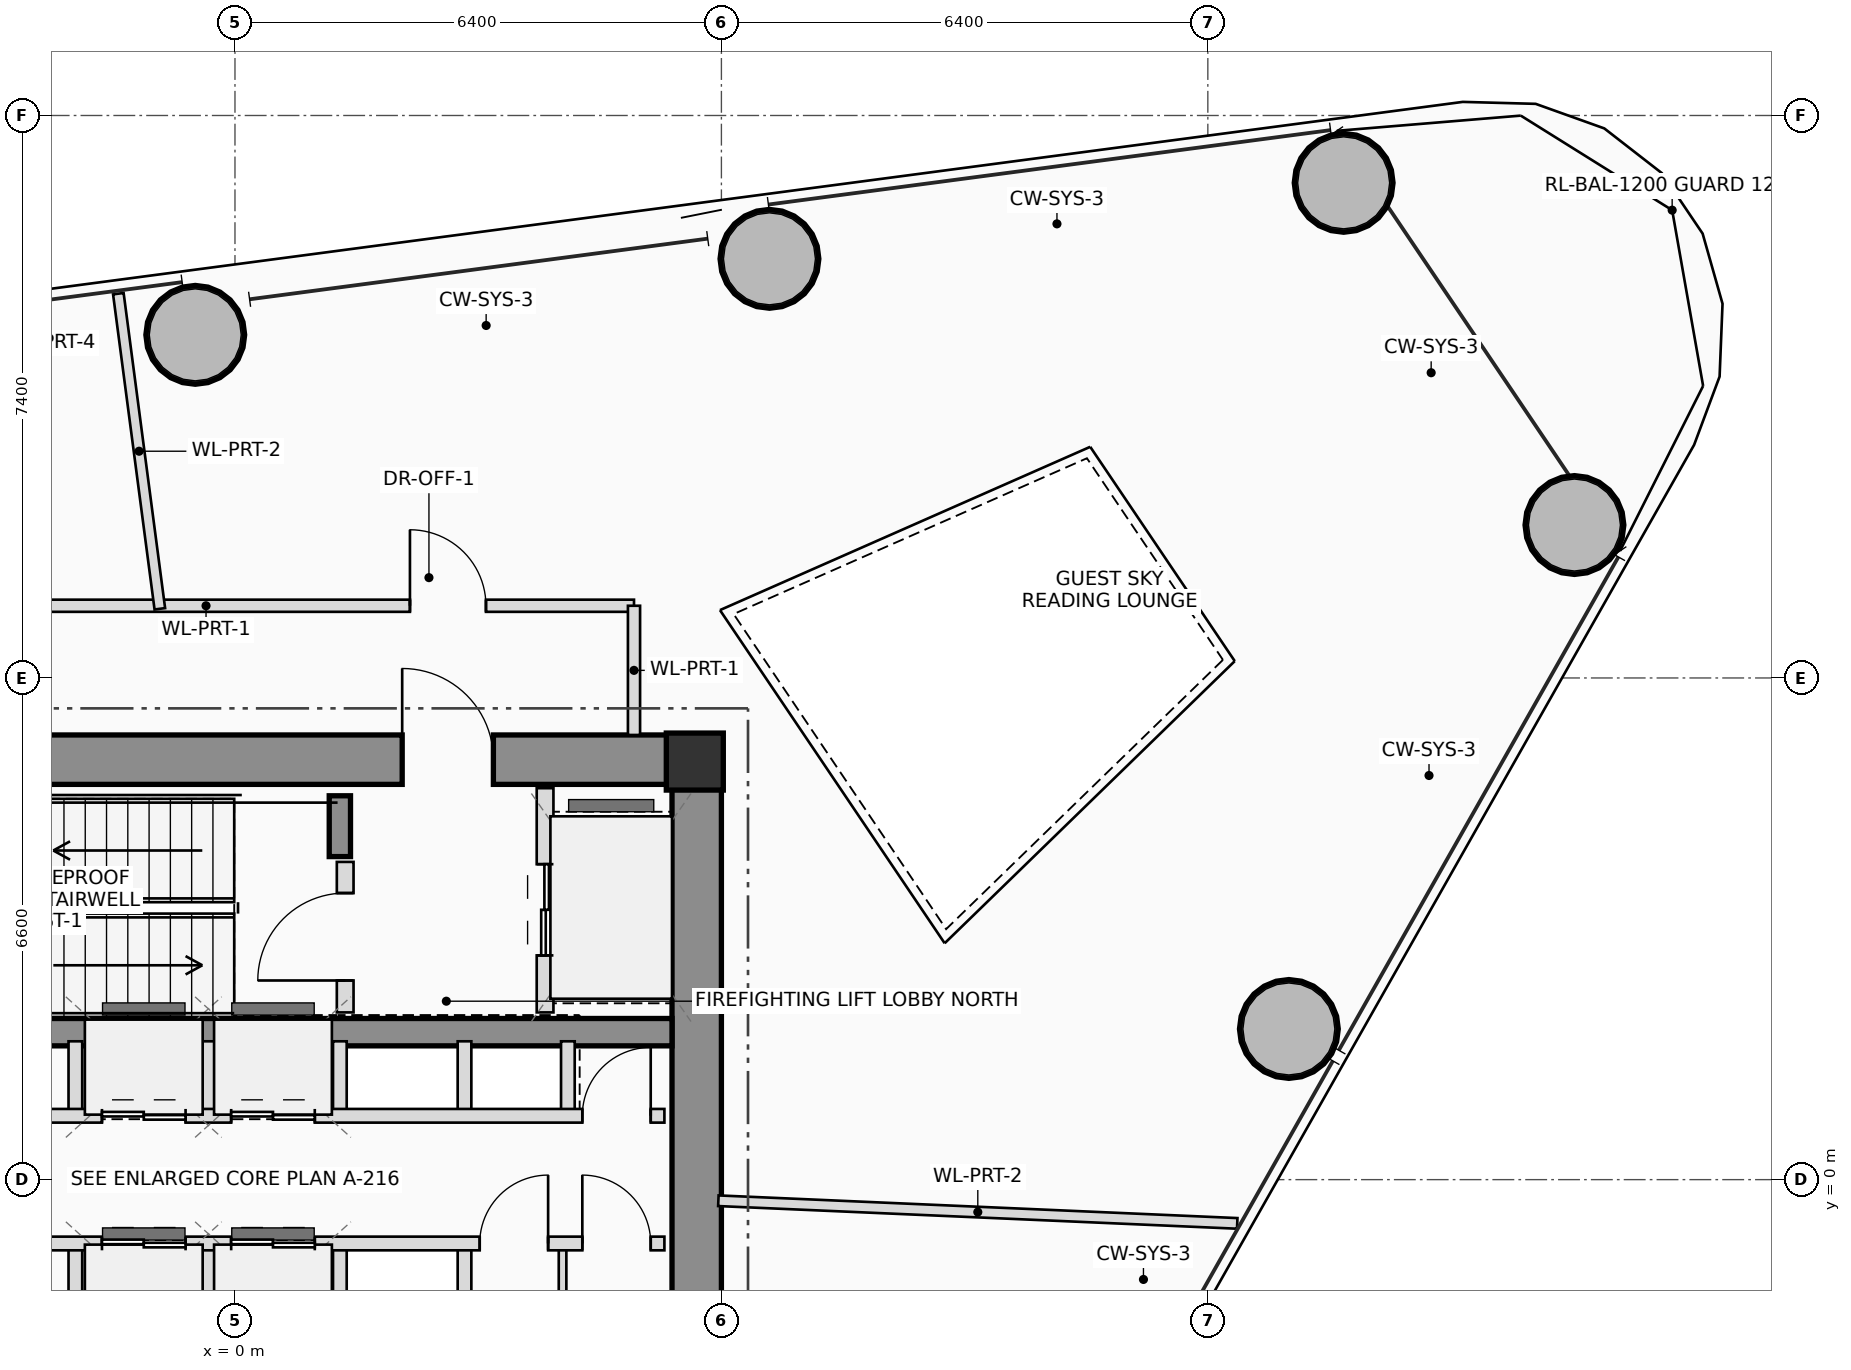
"""IFC4 building model, lengths in metres.
Left out: names, types, materials, properties, quantities, classifications, styles, units other than length and angle.
Written with IfcOpenShell. Run it as: python <this file> out.ifc"""

import sys

from ifc_helpers import new_model, si_unit, direction, frame, frame_2d, origin, origin_2d, place, context, subcontext, project, spatial, rectangle, hollow_circle, extrude, source, transform, mapped, element, fill, save


model = new_model("IFC4")
c1 = context("Model", 3, precision=1e-05, world=origin(), true_north=direction((0.0, 1.0)))
c2 = subcontext(c1, "Body", "Model", "MODEL_VIEW")
j1 = project(units=[si_unit("LENGTHUNIT", "METRE"), si_unit("PLANEANGLEUNIT", "RADIAN")], contexts=[c1])
p1 = place(None, origin())
s1 = spatial("IfcSite", under=j1, at=p1, CompositionType="ELEMENT")
p2 = place(p1, origin())
s2 = spatial("IfcBuilding", under=s1, at=p2, CompositionType="ELEMENT")
p3 = place(p2, frame((0.0, 0.0, 169.1)))
s3 = spatial("IfcBuildingStorey", under=s2, at=p3, CompositionType="ELEMENT", Elevation=169.1)
m1 = source(origin(), c2, "Body", "SweptSolid", [
    extrude(rectangle(XDim=0.75, YDim=0.75, at=origin_2d()), origin(), (0.0, 0.0, 1.0), 3.45),
])
p4 = place(p3, frame((6.05, 5.5, 0.0), z_axis=(0.0, 0.0, 1.0), x_axis=(1.0, 0.0, 0.0)))
e1 = element("IfcColumn", 1, at=p4, inside=s3, PredefinedType="COLUMN", context=c2, shape_type="MappedRepresentation", body=[
    mapped(m1, transform((0.0, 0.0, 0.0), scale=1.0)),
])
p5 = place(p3, frame((-6.4, 5.525, 0.0), z_axis=(0.0, 0.0, 1.0), x_axis=(1.0, 0.0, 0.0)))
e2 = element("IfcWall", 2, at=p5, inside=s3, PredefinedType="SHEAR", context=c2, shape_type="SweptSolid", body=[
    extrude(rectangle(XDim=12.8, YDim=0.65, at=frame_2d((6.4, 0.0))), origin(), (0.0, 0.0, 1.0), 3.45),
])
p6 = place(p5, frame((8.6, 0.0, 0.0)))
e3 = element("IfcOpeningElement", 3, at=p6, cuts=e2, PredefinedType="OPENING", context=c2, shape_type="SweptSolid", body=[
    extrude(rectangle(XDim=1.2, YDim=2.2, at=frame_2d((0.6, 1.1))), frame((0.0, 0.335, 0.0), z_axis=(0.0, -1.0, 0.0), x_axis=(1.0, 0.0, 0.0)), (0.0, 0.0, 1.0), 0.67),
])
p7 = place(p3, frame((6.075, -5.2, 0.0), z_axis=(0.0, 0.0, 1.0), x_axis=(0.0, 1.0, 0.0)))
e4 = element("IfcWall", 4, at=p7, inside=s3, PredefinedType="SHEAR", context=c2, shape_type="SweptSolid", body=[
    extrude(rectangle(XDim=10.4, YDim=0.65, at=frame_2d((5.2, 0.0))), origin(), (0.0, 0.0, 1.0), 3.45),
])
p8 = place(p3, frame((-5.75, 1.94, 0.0), z_axis=(0.0, 0.0, 1.0), x_axis=(1.0, 0.0, 0.0)))
e5 = element("IfcWall", 5, at=p8, inside=s3, PredefinedType="SHEAR", context=c2, shape_type="SweptSolid", body=[
    extrude(rectangle(XDim=11.5, YDim=0.36, at=frame_2d((5.75, 0.0))), origin(), (0.0, 0.0, 1.0), 3.45),
])
p9 = place(p3, frame((1.38, 4.25, 0.0), z_axis=(0.0, 0.0, 1.0), x_axis=(0.0, 1.0, 0.0)))
e6 = element("IfcWall", 6, at=p9, inside=s3, PredefinedType="SHEAR", context=c2, shape_type="SweptSolid", body=[
    extrude(rectangle(XDim=0.8, YDim=0.28, at=frame_2d((0.4, 0.0))), origin(), (0.0, 0.0, 1.0), 3.45),
])
m2 = source(origin(), c2, "Body", "SweptSolid", [
    extrude(hollow_circle(Radius=0.65, WallThickness=0.045, at=origin_2d()), origin(), (0.0, 0.0, 1.0), 3.45),
])
for number, where, z_axis, x_axis in (
    (7, (13.866, 1.982, 0.0), (0.0, 0.0, 1.0), (1.0, 0.0, 0.0)),
    (8, (17.624, 8.612, 0.0), (0.0, 0.0, 1.0), (1.0, 0.0, 0.0)),
    (9, (14.587, 13.114, 0.0), (0.0, 0.0, 1.0), (1.0, 0.0, 0.0)),
    (10, (7.032, 12.114, 0.0), (0.0, 0.0, 1.0), (1.0, 0.0, 0.0)),
    (11, (-0.522, 11.114, 0.0), (0.0, 0.0, 1.0), (1.0, 0.0, 0.0)),
):
    element("IfcColumn", number, at=place(p3, frame(where, z_axis=z_axis, x_axis=x_axis)), inside=s3, PredefinedType="COLUMN", context=c2, shape_type="MappedRepresentation", body=[
        mapped(m2, transform((0.0, 0.0, 0.0), scale=1.0)),
    ])
p10 = place(p3, frame((1.45, 2.2, 0.0), z_axis=(0.0, 0.0, 1.0), x_axis=(0.0, 1.0, 0.0)))
e12 = element("IfcWall", 12, at=p10, inside=s3, PredefinedType="PLUMBINGWALL", context=c2, shape_type="SweptSolid", body=[
    extrude(rectangle(XDim=1.98, YDim=0.22, at=frame_2d((0.99, 0.0))), origin(), (0.0, 0.0, 1.0), 3.25),
])
p11 = place(p10, frame((0.42, 0.0, 0.0)))
e13 = element("IfcOpeningElement", 13, at=p11, cuts=e12, PredefinedType="OPENING", context=c2, shape_type="SweptSolid", body=[
    extrude(rectangle(XDim=1.15, YDim=2.15, at=frame_2d((0.575, 1.075))), frame((0.0, 0.12, 0.0), z_axis=(0.0, -1.0, 0.0), x_axis=(1.0, 0.0, 0.0)), (0.0, 0.0, 1.0), 0.24),
])
p12 = place(p3, frame((4.08, 2.2, 0.0), z_axis=(0.0, 0.0, 1.0), x_axis=(0.0, 1.0, 0.0)))
e14 = element("IfcWall", 14, at=p12, inside=s3, PredefinedType="PLUMBINGWALL", context=c2, shape_type="SweptSolid", body=[
    extrude(rectangle(XDim=2.95, YDim=0.22, at=frame_2d((1.475, 0.0))), origin(), (0.0, 0.0, 1.0), 3.25),
])
p13 = place(p12, frame((0.75, 0.0, 0.0)))
e15 = element("IfcOpeningElement", 15, at=p13, cuts=e14, PredefinedType="OPENING", context=c2, shape_type="SweptSolid", body=[
    extrude(rectangle(XDim=1.2, YDim=2.25, at=frame_2d((0.6, 1.125))), frame((0.0, 0.12, 0.0), z_axis=(0.0, -1.0, 0.0), x_axis=(1.0, 0.0, 0.0)), (0.0, 0.0, 1.0), 0.24),
])
for number, where, z_axis, x_axis in (
    (16, (-2.1, 0.84, 0.0), (0.0, 0.0, 1.0), (0.0, 1.0, 0.0)),
    (17, (-2.1, -1.82, 0.0), (0.0, 0.0, 1.0), (0.0, 1.0, 0.0)),
    (18, (-0.35, 0.84, 0.0), (0.0, 0.0, 1.0), (0.0, 1.0, 0.0)),
    (19, (-0.35, -1.82, 0.0), (0.0, 0.0, 1.0), (0.0, 1.0, 0.0)),
    (20, (1.38, 0.84, 0.0), (0.0, 0.0, 1.0), (0.0, 1.0, 0.0)),
    (21, (1.38, -1.82, 0.0), (0.0, 0.0, 1.0), (0.0, 1.0, 0.0)),
    (22, (3.02, 0.84, 0.0), (0.0, 0.0, 1.0), (0.0, 1.0, 0.0)),
    (23, (4.38, 0.84, 0.0), (0.0, 0.0, 1.0), (0.0, 1.0, 0.0)),
    (24, (3.02, -1.82, 0.0), (0.0, 0.0, 1.0), (0.0, 1.0, 0.0)),
):
    element("IfcWall", number, at=place(p3, frame(where, z_axis=z_axis, x_axis=x_axis)), inside=s3, PredefinedType="PLUMBINGWALL", context=c2, shape_type="SweptSolid", body=[
        extrude(rectangle(XDim=0.98, YDim=0.18, at=frame_2d((0.49, 0.0))), origin(), (0.0, 0.0, 1.0), 3.25),
    ])
p14 = place(p3, frame((4.31, -1.82, 0.0), z_axis=(0.0, 0.0, 1.0), x_axis=(0.0, 1.0, 0.0)))
e25 = element("IfcWall", 25, at=p14, inside=s3, PredefinedType="PARTITIONING", context=c2, shape_type="SweptSolid", body=[
    extrude(rectangle(XDim=0.98, YDim=0.1, at=frame_2d((0.49, 0.0))), origin(), (0.0, 0.0, 1.0), 3.25),
])
p15 = place(p3, frame((-5.68, 0.84, 0.0), z_axis=(0.0, 0.0, 1.0), x_axis=(1.0, 0.0, 0.0)))
e26 = element("IfcWall", 26, at=p15, inside=s3, PredefinedType="PLUMBINGWALL", context=c2, shape_type="SweptSolid", body=[
    extrude(rectangle(XDim=11.33, YDim=0.18, at=frame_2d((5.665, 0.0))), origin(), (0.0, 0.0, 1.0), 3.25),
])
p16 = place(p15, frame((1.58, 0.0, 0.0)))
e27 = element("IfcOpeningElement", 27, at=p16, cuts=e26, PredefinedType="OPENING", context=c2, shape_type="SweptSolid", body=[
    extrude(rectangle(XDim=0.92, YDim=2.1, at=frame_2d((0.46, 1.05))), frame((0.0, 0.1, 0.0), z_axis=(0.0, -1.0, 0.0), x_axis=(1.0, 0.0, 0.0)), (0.0, 0.0, 1.0), 0.2),
])
p17 = place(p15, frame((3.93, 0.0, 0.0)))
e28 = element("IfcOpeningElement", 28, at=p17, cuts=e26, PredefinedType="OPENING", context=c2, shape_type="SweptSolid", body=[
    extrude(rectangle(XDim=1.1, YDim=2.2, at=frame_2d((0.55, 1.1))), frame((0.0, 0.1, 0.0), z_axis=(0.0, -1.0, 0.0), x_axis=(1.0, 0.0, 0.0)), (0.0, 0.0, 1.0), 0.2),
])
p18 = place(p15, frame((5.63, 0.0, 0.0)))
e29 = element("IfcOpeningElement", 29, at=p18, cuts=e26, PredefinedType="OPENING", context=c2, shape_type="SweptSolid", body=[
    extrude(rectangle(XDim=1.1, YDim=2.2, at=frame_2d((0.55, 1.1))), frame((0.0, 0.1, 0.0), z_axis=(0.0, -1.0, 0.0), x_axis=(1.0, 0.0, 0.0)), (0.0, 0.0, 1.0), 0.2),
])
p19 = place(p15, frame((10.25, 0.0, 0.0)))
e30 = element("IfcOpeningElement", 30, at=p19, cuts=e26, PredefinedType="OPENING", context=c2, shape_type="SweptSolid", body=[
    extrude(rectangle(XDim=0.9, YDim=2.05, at=frame_2d((0.45, 1.025))), frame((0.0, 0.1, 0.0), z_axis=(0.0, -1.0, 0.0), x_axis=(1.0, 0.0, 0.0)), (0.0, 0.0, 1.0), 0.2),
])
p20 = place(p3, frame((-5.68, -0.84, 0.0), z_axis=(0.0, 0.0, 1.0), x_axis=(1.0, 0.0, 0.0)))
e31 = element("IfcWall", 31, at=p20, inside=s3, PredefinedType="PLUMBINGWALL", context=c2, shape_type="SweptSolid", body=[
    extrude(rectangle(XDim=11.33, YDim=0.18, at=frame_2d((5.665, 0.0))), origin(), (0.0, 0.0, 1.0), 3.25),
])
p21 = place(p20, frame((1.18, 0.0, 0.0)))
e32 = element("IfcOpeningElement", 32, at=p21, cuts=e31, PredefinedType="OPENING", context=c2, shape_type="SweptSolid", body=[
    extrude(rectangle(XDim=0.9, YDim=2.05, at=frame_2d((0.45, 1.025))), frame((0.0, 0.1, 0.0), z_axis=(0.0, -1.0, 0.0), x_axis=(1.0, 0.0, 0.0)), (0.0, 0.0, 1.0), 0.2),
])
p22 = place(p20, frame((3.93, 0.0, 0.0)))
e33 = element("IfcOpeningElement", 33, at=p22, cuts=e31, PredefinedType="OPENING", context=c2, shape_type="SweptSolid", body=[
    extrude(rectangle(XDim=1.1, YDim=2.2, at=frame_2d((0.55, 1.1))), frame((0.0, 0.1, 0.0), z_axis=(0.0, -1.0, 0.0), x_axis=(1.0, 0.0, 0.0)), (0.0, 0.0, 1.0), 0.2),
])
p23 = place(p20, frame((5.63, 0.0, 0.0)))
e34 = element("IfcOpeningElement", 34, at=p23, cuts=e31, PredefinedType="OPENING", context=c2, shape_type="SweptSolid", body=[
    extrude(rectangle(XDim=1.1, YDim=2.2, at=frame_2d((0.55, 1.1))), frame((0.0, 0.1, 0.0), z_axis=(0.0, -1.0, 0.0), x_axis=(1.0, 0.0, 0.0)), (0.0, 0.0, 1.0), 0.2),
])
p24 = place(p20, frame((8.9, 0.0, 0.0)))
e35 = element("IfcOpeningElement", 35, at=p24, cuts=e31, PredefinedType="OPENING", context=c2, shape_type="SweptSolid", body=[
    extrude(rectangle(XDim=0.9, YDim=2.05, at=frame_2d((0.45, 1.025))), frame((0.0, 0.1, 0.0), z_axis=(0.0, -1.0, 0.0), x_axis=(1.0, 0.0, 0.0)), (0.0, 0.0, 1.0), 0.2),
])
p25 = place(p20, frame((10.25, 0.0, 0.0)))
e36 = element("IfcOpeningElement", 36, at=p25, cuts=e31, PredefinedType="OPENING", context=c2, shape_type="SweptSolid", body=[
    extrude(rectangle(XDim=0.9, YDim=2.05, at=frame_2d((0.45, 1.025))), frame((0.0, 0.1, 0.0), z_axis=(0.0, -1.0, 0.0), x_axis=(1.0, 0.0, 0.0)), (0.0, 0.0, 1.0), 0.2),
])
p26 = place(p3, frame((-6.36, 7.55, 0.0), z_axis=(0.0, 0.0, 1.0), x_axis=(1.0, 0.0, 0.0)))
e37 = element("IfcWall", 37, at=p26, inside=s3, PredefinedType="PARTITIONING", context=c2, shape_type="SweptSolid", body=[
    extrude(rectangle(XDim=11.61, YDim=0.16, at=frame_2d((5.805, 0.0))), origin(), (0.0, 0.0, 1.0), 2.605),
])
p27 = place(p26, frame((2.246, 0.0, 0.0)))
e38 = element("IfcOpeningElement", 38, at=p27, cuts=e37, PredefinedType="OPENING", context=c2, shape_type="SweptSolid", body=[
    extrude(rectangle(XDim=1.05, YDim=2.2, at=frame_2d((0.525, 1.1))), frame((0.0, 0.09, 0.0), z_axis=(0.0, -1.0, 0.0), x_axis=(1.0, 0.0, 0.0)), (0.0, 0.0, 1.0), 0.18),
])
p28 = place(p26, frame((8.662, 0.0, 0.0)))
e39 = element("IfcOpeningElement", 39, at=p28, cuts=e37, PredefinedType="OPENING", context=c2, shape_type="SweptSolid", body=[
    extrude(rectangle(XDim=1.0, YDim=2.25, at=frame_2d((0.5, 1.125))), frame((0.0, 0.09, 0.0), z_axis=(0.0, -1.0, 0.0), x_axis=(1.0, 0.0, 0.0)), (0.0, 0.0, 1.0), 0.18),
])
p29 = place(p3, frame((5.25, 7.55, 0.0), z_axis=(0.0, 0.0, 1.0), x_axis=(0.0, -1.0, 0.0)))
e40 = element("IfcWall", 40, at=p29, inside=s3, PredefinedType="PARTITIONING", context=c2, shape_type="SweptSolid", body=[
    extrude(rectangle(XDim=1.7, YDim=0.16, at=frame_2d((0.85, 0.0))), origin(), (0.0, 0.0, 1.0), 3.25),
])
p30 = place(p3, frame((6.36, -0.278, 0.0), z_axis=(0.0, 0.0, 1.0), x_axis=(0.999047983793, -0.043624833281, 0.0)))
e41 = element("IfcWall", 41, at=p30, inside=s3, PredefinedType="PARTITIONING", context=c2, shape_type="SweptSolid", body=[
    extrude(rectangle(XDim=6.833, YDim=0.14, at=frame_2d((3.417, 0.0))), origin(), (0.0, 0.0, 1.0), 2.605),
])
p31 = place(p3, frame((-0.989, 7.51, 0.0), z_axis=(0.0, 0.0, 1.0), x_axis=(-0.130484717168, 0.991450320785, 0.0)))
e42 = element("IfcWall", 42, at=p31, inside=s3, PredefinedType="PARTITIONING", context=c2, shape_type="SweptSolid", body=[
    extrude(rectangle(XDim=4.182, YDim=0.14, at=frame_2d((2.091, 0.0))), origin(), (0.0, 0.0, 1.0), 2.605),
])
p32 = place(p6, origin())
e43 = element("IfcDoor", 43, at=p32, inside=s3, OperationType="SINGLE_SWING_LEFT", PredefinedType="DOOR", context=c2, shape_type="SweptSolid", body=[
    extrude(rectangle(XDim=1.2, YDim=2.2, at=frame_2d((0.6, 1.1))), frame((0.0, 0.025, 0.0), z_axis=(0.0, -1.0, 0.0), x_axis=(1.0, 0.0, 0.0)), (0.0, 0.0, 1.0), 0.05),
])
fill(e3, e43)
p33 = place(p11, origin())
e44 = element("IfcDoor", 44, at=p33, inside=s3, OperationType="SINGLE_SWING_LEFT", PredefinedType="DOOR", context=c2, shape_type="SweptSolid", body=[
    extrude(rectangle(XDim=1.15, YDim=2.15, at=frame_2d((0.575, 1.075))), frame((0.0, 0.025, 0.0), z_axis=(0.0, -1.0, 0.0), x_axis=(1.0, 0.0, 0.0)), (0.0, 0.0, 1.0), 0.05),
])
fill(e13, e44)
p34 = place(p13, origin())
e45 = element("IfcDoor", 45, at=p34, inside=s3, OperationType="DOUBLE_DOOR_SLIDING", PredefinedType="DOOR", context=c2, shape_type="SweptSolid", body=[
    extrude(rectangle(XDim=1.2, YDim=2.25, at=frame_2d((0.6, 1.125))), frame((0.0, 0.025, 0.0), z_axis=(0.0, -1.0, 0.0), x_axis=(1.0, 0.0, 0.0)), (0.0, 0.0, 1.0), 0.05),
])
fill(e15, e45)
p35 = place(p17, origin())
e46 = element("IfcDoor", 46, at=p35, inside=s3, OperationType="DOUBLE_DOOR_SLIDING", PredefinedType="DOOR", context=c2, shape_type="SweptSolid", body=[
    extrude(rectangle(XDim=1.1, YDim=2.2, at=frame_2d((0.55, 1.1))), frame((0.0, 0.025, 0.0), z_axis=(0.0, -1.0, 0.0), x_axis=(1.0, 0.0, 0.0)), (0.0, 0.0, 1.0), 0.05),
])
fill(e28, e46)
p36 = place(p18, origin())
e47 = element("IfcDoor", 47, at=p36, inside=s3, OperationType="DOUBLE_DOOR_SLIDING", PredefinedType="DOOR", context=c2, shape_type="SweptSolid", body=[
    extrude(rectangle(XDim=1.1, YDim=2.2, at=frame_2d((0.55, 1.1))), frame((0.0, 0.025, 0.0), z_axis=(0.0, -1.0, 0.0), x_axis=(1.0, 0.0, 0.0)), (0.0, 0.0, 1.0), 0.05),
])
fill(e29, e47)
p37 = place(p19, origin())
e48 = element("IfcDoor", 48, at=p37, inside=s3, OperationType="SINGLE_SWING_RIGHT", PredefinedType="DOOR", context=c2, shape_type="SweptSolid", body=[
    extrude(rectangle(XDim=0.9, YDim=2.05, at=frame_2d((0.45, 1.025))), frame((0.0, 0.025, 0.0), z_axis=(0.0, -1.0, 0.0), x_axis=(1.0, 0.0, 0.0)), (0.0, 0.0, 1.0), 0.05),
])
fill(e30, e48)
p38 = place(p22, origin())
e49 = element("IfcDoor", 49, at=p38, inside=s3, OperationType="DOUBLE_DOOR_SLIDING", PredefinedType="DOOR", context=c2, shape_type="SweptSolid", body=[
    extrude(rectangle(XDim=1.1, YDim=2.2, at=frame_2d((0.55, 1.1))), frame((0.0, 0.025, 0.0), z_axis=(0.0, -1.0, 0.0), x_axis=(1.0, 0.0, 0.0)), (0.0, 0.0, 1.0), 0.05),
])
fill(e33, e49)
p39 = place(p23, origin())
e50 = element("IfcDoor", 50, at=p39, inside=s3, OperationType="DOUBLE_DOOR_SLIDING", PredefinedType="DOOR", context=c2, shape_type="SweptSolid", body=[
    extrude(rectangle(XDim=1.1, YDim=2.2, at=frame_2d((0.55, 1.1))), frame((0.0, 0.025, 0.0), z_axis=(0.0, -1.0, 0.0), x_axis=(1.0, 0.0, 0.0)), (0.0, 0.0, 1.0), 0.05),
])
fill(e34, e50)
p40 = place(p24, origin())
e51 = element("IfcDoor", 51, at=p40, inside=s3, OperationType="SINGLE_SWING_RIGHT", PredefinedType="DOOR", context=c2, shape_type="SweptSolid", body=[
    extrude(rectangle(XDim=0.9, YDim=2.05, at=frame_2d((0.45, 1.025))), frame((0.0, 0.025, 0.0), z_axis=(0.0, -1.0, 0.0), x_axis=(1.0, 0.0, 0.0)), (0.0, 0.0, 1.0), 0.05),
])
fill(e35, e51)
p41 = place(p25, origin())
e52 = element("IfcDoor", 52, at=p41, inside=s3, OperationType="SINGLE_SWING_LEFT", PredefinedType="DOOR", context=c2, shape_type="SweptSolid", body=[
    extrude(rectangle(XDim=0.9, YDim=2.05, at=frame_2d((0.45, 1.025))), frame((0.0, 0.025, 0.0), z_axis=(0.0, -1.0, 0.0), x_axis=(1.0, 0.0, 0.0)), (0.0, 0.0, 1.0), 0.05),
])
fill(e36, e52)
p42 = place(p28, origin())
e53 = element("IfcDoor", 53, at=p42, inside=s3, OperationType="SINGLE_SWING_LEFT", PredefinedType="DOOR", context=c2, shape_type="SweptSolid", body=[
    extrude(rectangle(XDim=1.0, YDim=2.25, at=frame_2d((0.5, 1.125))), frame((0.0, 0.025, 0.0), z_axis=(0.0, -1.0, 0.0), x_axis=(1.0, 0.0, 0.0)), (0.0, 0.0, 1.0), 0.05),
])
fill(e39, e53)
save(model, sys.argv[1])
